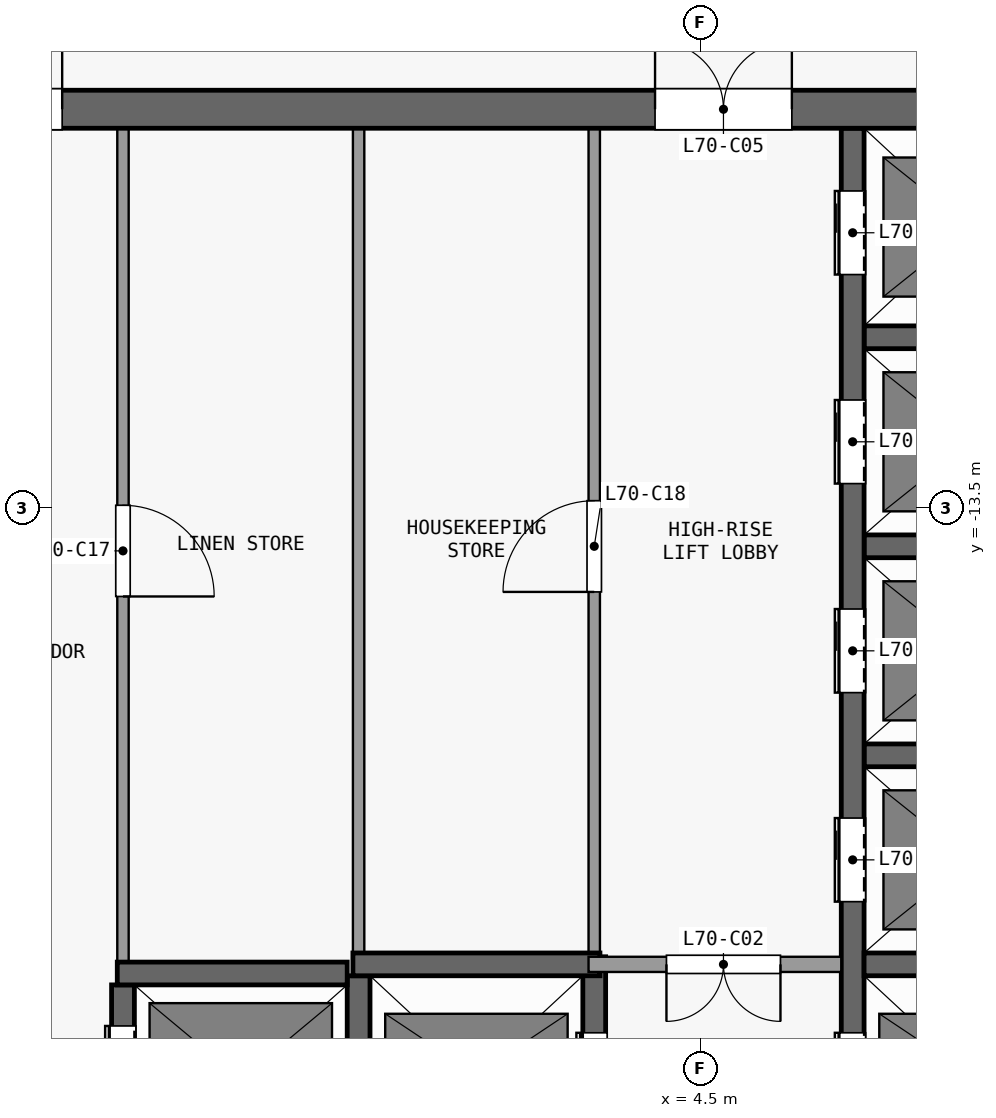
"""IFC4 building model, lengths in metres.
Left out: names, types, materials, properties, quantities, classifications, styles, units other than length and angle.
Written with IfcOpenShell. Run it as: python <this file> out.ifc"""

import sys

from ifc_helpers import new_model, si_unit, direction, frame, frame_2d, origin, place, context, subcontext, project, spatial, rectangle, extrude, element, fill, save


model = new_model("IFC4")
c1 = context("Model", 3, precision=1e-05, world=origin(), true_north=direction((0.0, 1.0)))
c2 = subcontext(c1, "Body", "Model", "MODEL_VIEW")
j1 = project(units=[si_unit("LENGTHUNIT", "METRE"), si_unit("PLANEANGLEUNIT", "RADIAN")], contexts=[c1])
p1 = place(None, origin())
s1 = spatial("IfcSite", under=j1, at=p1, CompositionType="ELEMENT")
p2 = place(p1, origin())
s2 = spatial("IfcBuilding", under=s1, at=p2, CompositionType="ELEMENT")
p3 = place(p2, frame((0.0, 0.0, 277.1)))
s3 = spatial("IfcBuildingStorey", under=s2, at=p3, CompositionType="ELEMENT", Elevation=277.1)
p4 = place(p3, frame((-13.1, -8.25, 0.0), z_axis=(0.0, 0.0, 1.0), x_axis=(1.0, 0.0, 0.0)))
e1 = element("IfcWall", 1, at=p4, inside=s3, PredefinedType="SHEAR", context=c2, shape_type="SweptSolid", body=[
    extrude(rectangle(XDim=26.2, YDim=0.5, at=frame_2d((13.1, 0.0))), origin(), (0.0, 0.0, 1.0), 3.3),
])
p5 = place(p4, frame((7.4, 0.0, 0.0)))
e2 = element("IfcOpeningElement", 2, at=p5, cuts=e1, PredefinedType="OPENING", context=c2, shape_type="SweptSolid", body=[
    extrude(rectangle(XDim=1.8, YDim=2.1, at=frame_2d((0.9, 1.05))), frame((0.0, 0.26, 0.0), z_axis=(0.0, -1.0, 0.0), x_axis=(1.0, 0.0, 0.0)), (0.0, 0.0, 1.0), 0.52),
])
p6 = place(p4, frame((17.0, 0.0, 0.0)))
e3 = element("IfcOpeningElement", 3, at=p6, cuts=e1, PredefinedType="OPENING", context=c2, shape_type="SweptSolid", body=[
    extrude(rectangle(XDim=1.8, YDim=2.1, at=frame_2d((0.9, 1.05))), frame((0.0, 0.26, 0.0), z_axis=(0.0, -1.0, 0.0), x_axis=(1.0, 0.0, 0.0)), (0.0, 0.0, 1.0), 0.52),
])
p7 = place(p4, frame((2.325, 0.0, 0.0)))
e4 = element("IfcOpeningElement", 4, at=p7, cuts=e1, PredefinedType="OPENING", context=c2, shape_type="SweptSolid", body=[
    extrude(rectangle(XDim=0.9, YDim=2.1, at=frame_2d((0.45, 1.05))), frame((0.0, 0.26, 0.0), z_axis=(0.0, -1.0, 0.0), x_axis=(1.0, 0.0, 0.0)), (0.0, 0.0, 1.0), 0.52),
])
p8 = place(p4, frame((22.975, 0.0, 0.0)))
e5 = element("IfcOpeningElement", 5, at=p8, cuts=e1, PredefinedType="OPENING", context=c2, shape_type="SweptSolid", body=[
    extrude(rectangle(XDim=0.9, YDim=2.1, at=frame_2d((0.45, 1.05))), frame((0.0, 0.26, 0.0), z_axis=(0.0, -1.0, 0.0), x_axis=(1.0, 0.0, 0.0)), (0.0, 0.0, 1.0), 0.52),
])
p9 = place(p3, frame((-3.175, -19.62, 0.0), z_axis=(0.0, 0.0, 1.0), x_axis=(1.0, 0.0, 0.0)))
e6 = element("IfcWall", 6, at=p9, inside=s3, PredefinedType="SHEAR", context=c2, shape_type="SweptSolid", body=[
    extrude(rectangle(XDim=3.025, YDim=0.3, at=frame_2d((1.513, 0.0))), origin(), (0.0, 0.0, 1.0), 3.3),
])
p10 = place(p3, frame((-0.075, -19.5, 0.0), z_axis=(0.0, 0.0, 1.0), x_axis=(1.0, 0.0, 0.0)))
e7 = element("IfcWall", 7, at=p10, inside=s3, PredefinedType="SHEAR", context=c2, shape_type="SweptSolid", body=[
    extrude(rectangle(XDim=3.25, YDim=0.3, at=frame_2d((1.625, 0.0))), origin(), (0.0, 0.0, 1.0), 3.3),
])
p11 = place(p3, frame((6.35, -19.5, 0.0), z_axis=(0.0, 0.0, 1.0), x_axis=(-1.0, 0.0, 0.0)))
e8 = element("IfcWall", 8, at=p11, inside=s3, PredefinedType="PARTITIONING", context=c2, shape_type="SweptSolid", body=[
    extrude(rectangle(XDim=3.325, YDim=0.2, at=frame_2d((1.663, 0.0))), origin(), (0.0, 0.0, 1.0), 3.3),
])
p12 = place(p11, frame((0.8, 0.0, 0.0)))
e9 = element("IfcOpeningElement", 9, at=p12, cuts=e8, PredefinedType="OPENING", context=c2, shape_type="SweptSolid", body=[
    extrude(rectangle(XDim=1.5, YDim=2.1, at=frame_2d((0.75, 1.05))), frame((0.0, 0.11, 0.0), z_axis=(0.0, -1.0, 0.0), x_axis=(1.0, 0.0, 0.0)), (0.0, 0.0, 1.0), 0.22),
])
for number, where, z_axis, x_axis in (
    (10, (6.65, -19.5, 0.0), (0.0, 0.0, 1.0), (1.0, 0.0, 0.0)),
    (11, (6.65, -16.75, 0.0), (0.0, 0.0, 1.0), (1.0, 0.0, 0.0)),
    (12, (6.65, -14.0, 0.0), (0.0, 0.0, 1.0), (1.0, 0.0, 0.0)),
    (13, (6.65, -11.25, 0.0), (0.0, 0.0, 1.0), (1.0, 0.0, 0.0)),
):
    element("IfcWall", number, at=place(p3, frame(where, z_axis=z_axis, x_axis=x_axis)), inside=s3, PredefinedType="SHEAR", context=c2, shape_type="SweptSolid", body=[
        extrude(rectangle(XDim=2.8, YDim=0.3, at=frame_2d((1.4, 0.0))), origin(), (0.0, 0.0, 1.0), 3.3),
    ])
p13 = place(p3, frame((-3.1, -22.25, 0.0), z_axis=(0.0, 0.0, 1.0), x_axis=(0.0, 1.0, 0.0)))
e14 = element("IfcWall", 14, at=p13, inside=s3, PredefinedType="SHEAR", context=c2, shape_type="SweptSolid", body=[
    extrude(rectangle(XDim=2.48, YDim=0.3, at=frame_2d((1.24, 0.0))), origin(), (0.0, 0.0, 1.0), 3.3),
])
p14 = place(p13, frame((0.54, 0.0, 0.0)))
e15 = element("IfcOpeningElement", 15, at=p14, cuts=e14, PredefinedType="OPENING", context=c2, shape_type="SweptSolid", body=[
    extrude(rectangle(XDim=1.4, YDim=2.1, at=frame_2d((0.7, 1.05))), frame((0.0, 0.16, 0.0), z_axis=(0.0, -1.0, 0.0), x_axis=(1.0, 0.0, 0.0)), (0.0, 0.0, 1.0), 0.32),
])
p15 = place(p3, frame((-3.1, -8.5, 0.0), z_axis=(0.0, 0.0, 1.0), x_axis=(0.0, -1.0, 0.0)))
e16 = element("IfcWall", 16, at=p15, inside=s3, PredefinedType="PARTITIONING", context=c2, shape_type="SweptSolid", body=[
    extrude(rectangle(XDim=10.97, YDim=0.15, at=frame_2d((5.485, 0.0))), origin(), (0.0, 0.0, 1.0), 3.3),
])
p16 = place(p15, frame((4.96, 0.0, 0.0)))
e17 = element("IfcOpeningElement", 17, at=p16, cuts=e16, PredefinedType="OPENING", context=c2, shape_type="SweptSolid", body=[
    extrude(rectangle(XDim=1.2, YDim=2.1, at=frame_2d((0.6, 1.05))), frame((0.0, 0.085, 0.0), z_axis=(0.0, -1.0, 0.0), x_axis=(1.0, 0.0, 0.0)), (0.0, 0.0, 1.0), 0.17),
])
p17 = place(p3, frame((0.0, -22.25, 0.0), z_axis=(0.0, 0.0, 1.0), x_axis=(0.0, 1.0, 0.0)))
e18 = element("IfcWall", 18, at=p17, inside=s3, PredefinedType="SHEAR", context=c2, shape_type="SweptSolid", body=[
    extrude(rectangle(XDim=2.6, YDim=0.3, at=frame_2d((1.3, 0.0))), origin(), (0.0, 0.0, 1.0), 3.3),
])
p18 = place(p3, frame((0.0, -19.35, 0.0), z_axis=(0.0, 0.0, 1.0), x_axis=(0.0, 1.0, 0.0)))
e19 = element("IfcWall", 19, at=p18, inside=s3, PredefinedType="PARTITIONING", context=c2, shape_type="SweptSolid", body=[
    extrude(rectangle(XDim=10.85, YDim=0.15, at=frame_2d((5.425, 0.0))), origin(), (0.0, 0.0, 1.0), 3.3),
])
p19 = place(p3, frame((3.1, -22.25, 0.0), z_axis=(0.0, 0.0, 1.0), x_axis=(0.0, 1.0, 0.0)))
e20 = element("IfcWall", 20, at=p19, inside=s3, PredefinedType="SHEAR", context=c2, shape_type="SweptSolid", body=[
    extrude(rectangle(XDim=2.85, YDim=0.3, at=frame_2d((1.425, 0.0))), origin(), (0.0, 0.0, 1.0), 3.3),
])
p20 = place(p19, frame((0.75, 0.0, 0.0)))
e21 = element("IfcOpeningElement", 21, at=p20, cuts=e20, PredefinedType="OPENING", context=c2, shape_type="SweptSolid", body=[
    extrude(rectangle(XDim=1.1, YDim=2.1, at=frame_2d((0.55, 1.05))), frame((0.0, 0.16, 0.0), z_axis=(0.0, -1.0, 0.0), x_axis=(1.0, 0.0, 0.0)), (0.0, 0.0, 1.0), 0.32),
])
p21 = place(p3, frame((3.1, -19.4, 0.0), z_axis=(0.0, 0.0, 1.0), x_axis=(0.0, 1.0, 0.0)))
e22 = element("IfcWall", 22, at=p21, inside=s3, PredefinedType="PARTITIONING", context=c2, shape_type="SweptSolid", body=[
    extrude(rectangle(XDim=10.9, YDim=0.15, at=frame_2d((5.45, 0.0))), origin(), (0.0, 0.0, 1.0), 3.3),
])
p22 = place(p21, frame((4.8, 0.0, 0.0)))
e23 = element("IfcOpeningElement", 23, at=p22, cuts=e22, PredefinedType="OPENING", context=c2, shape_type="SweptSolid", body=[
    extrude(rectangle(XDim=1.2, YDim=2.1, at=frame_2d((0.6, 1.05))), frame((0.0, 0.085, 0.0), z_axis=(0.0, -1.0, 0.0), x_axis=(1.0, 0.0, 0.0)), (0.0, 0.0, 1.0), 0.17),
])
p23 = place(p3, frame((6.5, -22.55, 0.0), z_axis=(0.0, 0.0, 1.0), x_axis=(0.0, 1.0, 0.0)))
e24 = element("IfcWall", 24, at=p23, inside=s3, PredefinedType="SHEAR", context=c2, shape_type="SweptSolid", body=[
    extrude(rectangle(XDim=14.05, YDim=0.3, at=frame_2d((7.025, 0.0))), origin(), (0.0, 0.0, 1.0), 3.3),
])
p24 = place(p23, frame((1.05, 0.0, 0.0)))
e25 = element("IfcOpeningElement", 25, at=p24, cuts=e24, PredefinedType="OPENING", context=c2, shape_type="SweptSolid", body=[
    extrude(rectangle(XDim=1.1, YDim=2.1, at=frame_2d((0.55, 1.05))), frame((0.0, 0.16, 0.0), z_axis=(0.0, -1.0, 0.0), x_axis=(1.0, 0.0, 0.0)), (0.0, 0.0, 1.0), 0.32),
])
p25 = place(p23, frame((3.875, 0.0, 0.0)))
e26 = element("IfcOpeningElement", 26, at=p25, cuts=e24, PredefinedType="OPENING", context=c2, shape_type="SweptSolid", body=[
    extrude(rectangle(XDim=1.1, YDim=2.1, at=frame_2d((0.55, 1.05))), frame((0.0, 0.16, 0.0), z_axis=(0.0, -1.0, 0.0), x_axis=(1.0, 0.0, 0.0)), (0.0, 0.0, 1.0), 0.32),
])
p26 = place(p23, frame((6.625, 0.0, 0.0)))
e27 = element("IfcOpeningElement", 27, at=p26, cuts=e24, PredefinedType="OPENING", context=c2, shape_type="SweptSolid", body=[
    extrude(rectangle(XDim=1.1, YDim=2.1, at=frame_2d((0.55, 1.05))), frame((0.0, 0.16, 0.0), z_axis=(0.0, -1.0, 0.0), x_axis=(1.0, 0.0, 0.0)), (0.0, 0.0, 1.0), 0.32),
])
p27 = place(p23, frame((9.375, 0.0, 0.0)))
e28 = element("IfcOpeningElement", 28, at=p27, cuts=e24, PredefinedType="OPENING", context=c2, shape_type="SweptSolid", body=[
    extrude(rectangle(XDim=1.1, YDim=2.1, at=frame_2d((0.55, 1.05))), frame((0.0, 0.16, 0.0), z_axis=(0.0, -1.0, 0.0), x_axis=(1.0, 0.0, 0.0)), (0.0, 0.0, 1.0), 0.32),
])
p28 = place(p23, frame((12.125, 0.0, 0.0)))
e29 = element("IfcOpeningElement", 29, at=p28, cuts=e24, PredefinedType="OPENING", context=c2, shape_type="SweptSolid", body=[
    extrude(rectangle(XDim=1.1, YDim=2.1, at=frame_2d((0.55, 1.05))), frame((0.0, 0.16, 0.0), z_axis=(0.0, -1.0, 0.0), x_axis=(1.0, 0.0, 0.0)), (0.0, 0.0, 1.0), 0.32),
])
p29 = place(p20, origin())
e30 = element("IfcDoor", 30, at=p29, inside=s3, OperationType="DOUBLE_DOOR_SLIDING", PredefinedType="DOOR", context=c2, shape_type="SweptSolid", body=[
    extrude(rectangle(XDim=1.1, YDim=2.1, at=frame_2d((0.55, 1.05))), frame((0.0, 0.025, 0.0), z_axis=(0.0, -1.0, 0.0), x_axis=(1.0, 0.0, 0.0)), (0.0, 0.0, 1.0), 0.05),
])
fill(e21, e30)
p30 = place(p24, origin())
e31 = element("IfcDoor", 31, at=p30, inside=s3, OperationType="DOUBLE_DOOR_SLIDING", PredefinedType="DOOR", context=c2, shape_type="SweptSolid", body=[
    extrude(rectangle(XDim=1.1, YDim=2.1, at=frame_2d((0.55, 1.05))), frame((0.0, 0.025, 0.0), z_axis=(0.0, -1.0, 0.0), x_axis=(1.0, 0.0, 0.0)), (0.0, 0.0, 1.0), 0.05),
])
fill(e25, e31)
p31 = place(p25, origin())
e32 = element("IfcDoor", 32, at=p31, inside=s3, OperationType="DOUBLE_DOOR_SLIDING", PredefinedType="DOOR", context=c2, shape_type="SweptSolid", body=[
    extrude(rectangle(XDim=1.1, YDim=2.1, at=frame_2d((0.55, 1.05))), frame((0.0, 0.025, 0.0), z_axis=(0.0, -1.0, 0.0), x_axis=(1.0, 0.0, 0.0)), (0.0, 0.0, 1.0), 0.05),
])
fill(e26, e32)
p32 = place(p26, origin())
e33 = element("IfcDoor", 33, at=p32, inside=s3, OperationType="DOUBLE_DOOR_SLIDING", PredefinedType="DOOR", context=c2, shape_type="SweptSolid", body=[
    extrude(rectangle(XDim=1.1, YDim=2.1, at=frame_2d((0.55, 1.05))), frame((0.0, 0.025, 0.0), z_axis=(0.0, -1.0, 0.0), x_axis=(1.0, 0.0, 0.0)), (0.0, 0.0, 1.0), 0.05),
])
fill(e27, e33)
p33 = place(p27, origin())
e34 = element("IfcDoor", 34, at=p33, inside=s3, OperationType="DOUBLE_DOOR_SLIDING", PredefinedType="DOOR", context=c2, shape_type="SweptSolid", body=[
    extrude(rectangle(XDim=1.1, YDim=2.1, at=frame_2d((0.55, 1.05))), frame((0.0, 0.025, 0.0), z_axis=(0.0, -1.0, 0.0), x_axis=(1.0, 0.0, 0.0)), (0.0, 0.0, 1.0), 0.05),
])
fill(e28, e34)
p34 = place(p28, origin())
e35 = element("IfcDoor", 35, at=p34, inside=s3, OperationType="DOUBLE_DOOR_SLIDING", PredefinedType="DOOR", context=c2, shape_type="SweptSolid", body=[
    extrude(rectangle(XDim=1.1, YDim=2.1, at=frame_2d((0.55, 1.05))), frame((0.0, 0.025, 0.0), z_axis=(0.0, -1.0, 0.0), x_axis=(1.0, 0.0, 0.0)), (0.0, 0.0, 1.0), 0.05),
])
fill(e29, e35)
p35 = place(p14, origin())
e36 = element("IfcDoor", 36, at=p35, inside=s3, OperationType="DOUBLE_DOOR_SLIDING", PredefinedType="DOOR", context=c2, shape_type="SweptSolid", body=[
    extrude(rectangle(XDim=1.4, YDim=2.1, at=frame_2d((0.7, 1.05))), frame((0.0, 0.025, 0.0), z_axis=(0.0, -1.0, 0.0), x_axis=(1.0, 0.0, 0.0)), (0.0, 0.0, 1.0), 0.05),
])
fill(e15, e36)
p36 = place(p12, origin())
e37 = element("IfcDoor", 37, at=p36, inside=s3, OperationType="DOUBLE_DOOR_SINGLE_SWING", PredefinedType="DOOR", context=c2, shape_type="SweptSolid", body=[
    extrude(rectangle(XDim=1.5, YDim=2.1, at=frame_2d((0.75, 1.05))), frame((0.0, 0.025, 0.0), z_axis=(0.0, -1.0, 0.0), x_axis=(1.0, 0.0, 0.0)), (0.0, 0.0, 1.0), 0.05),
])
fill(e9, e37)
p37 = place(p5, origin())
e38 = element("IfcDoor", 38, at=p37, inside=s3, OperationType="DOUBLE_DOOR_SINGLE_SWING", PredefinedType="DOOR", context=c2, shape_type="SweptSolid", body=[
    extrude(rectangle(XDim=1.8, YDim=2.1, at=frame_2d((0.9, 1.05))), frame((0.0, 0.025, 0.0), z_axis=(0.0, -1.0, 0.0), x_axis=(1.0, 0.0, 0.0)), (0.0, 0.0, 1.0), 0.05),
])
fill(e2, e38)
p38 = place(p6, origin())
e39 = element("IfcDoor", 39, at=p38, inside=s3, OperationType="DOUBLE_DOOR_SINGLE_SWING", PredefinedType="DOOR", context=c2, shape_type="SweptSolid", body=[
    extrude(rectangle(XDim=1.8, YDim=2.1, at=frame_2d((0.9, 1.05))), frame((0.0, 0.025, 0.0), z_axis=(0.0, -1.0, 0.0), x_axis=(1.0, 0.0, 0.0)), (0.0, 0.0, 1.0), 0.05),
])
fill(e3, e39)
p39 = place(p16, origin())
e40 = element("IfcDoor", 40, at=p39, inside=s3, OperationType="SINGLE_SWING_RIGHT", PredefinedType="DOOR", context=c2, shape_type="SweptSolid", body=[
    extrude(rectangle(XDim=1.2, YDim=2.1, at=frame_2d((0.6, 1.05))), frame((0.0, 0.025, 0.0), z_axis=(0.0, -1.0, 0.0), x_axis=(1.0, 0.0, 0.0)), (0.0, 0.0, 1.0), 0.05),
])
fill(e17, e40)
p40 = place(p22, origin())
e41 = element("IfcDoor", 41, at=p40, inside=s3, OperationType="SINGLE_SWING_LEFT", PredefinedType="DOOR", context=c2, shape_type="SweptSolid", body=[
    extrude(rectangle(XDim=1.2, YDim=2.1, at=frame_2d((0.6, 1.05))), frame((0.0, 0.025, 0.0), z_axis=(0.0, -1.0, 0.0), x_axis=(1.0, 0.0, 0.0)), (0.0, 0.0, 1.0), 0.05),
])
fill(e23, e41)
save(model, sys.argv[1])
